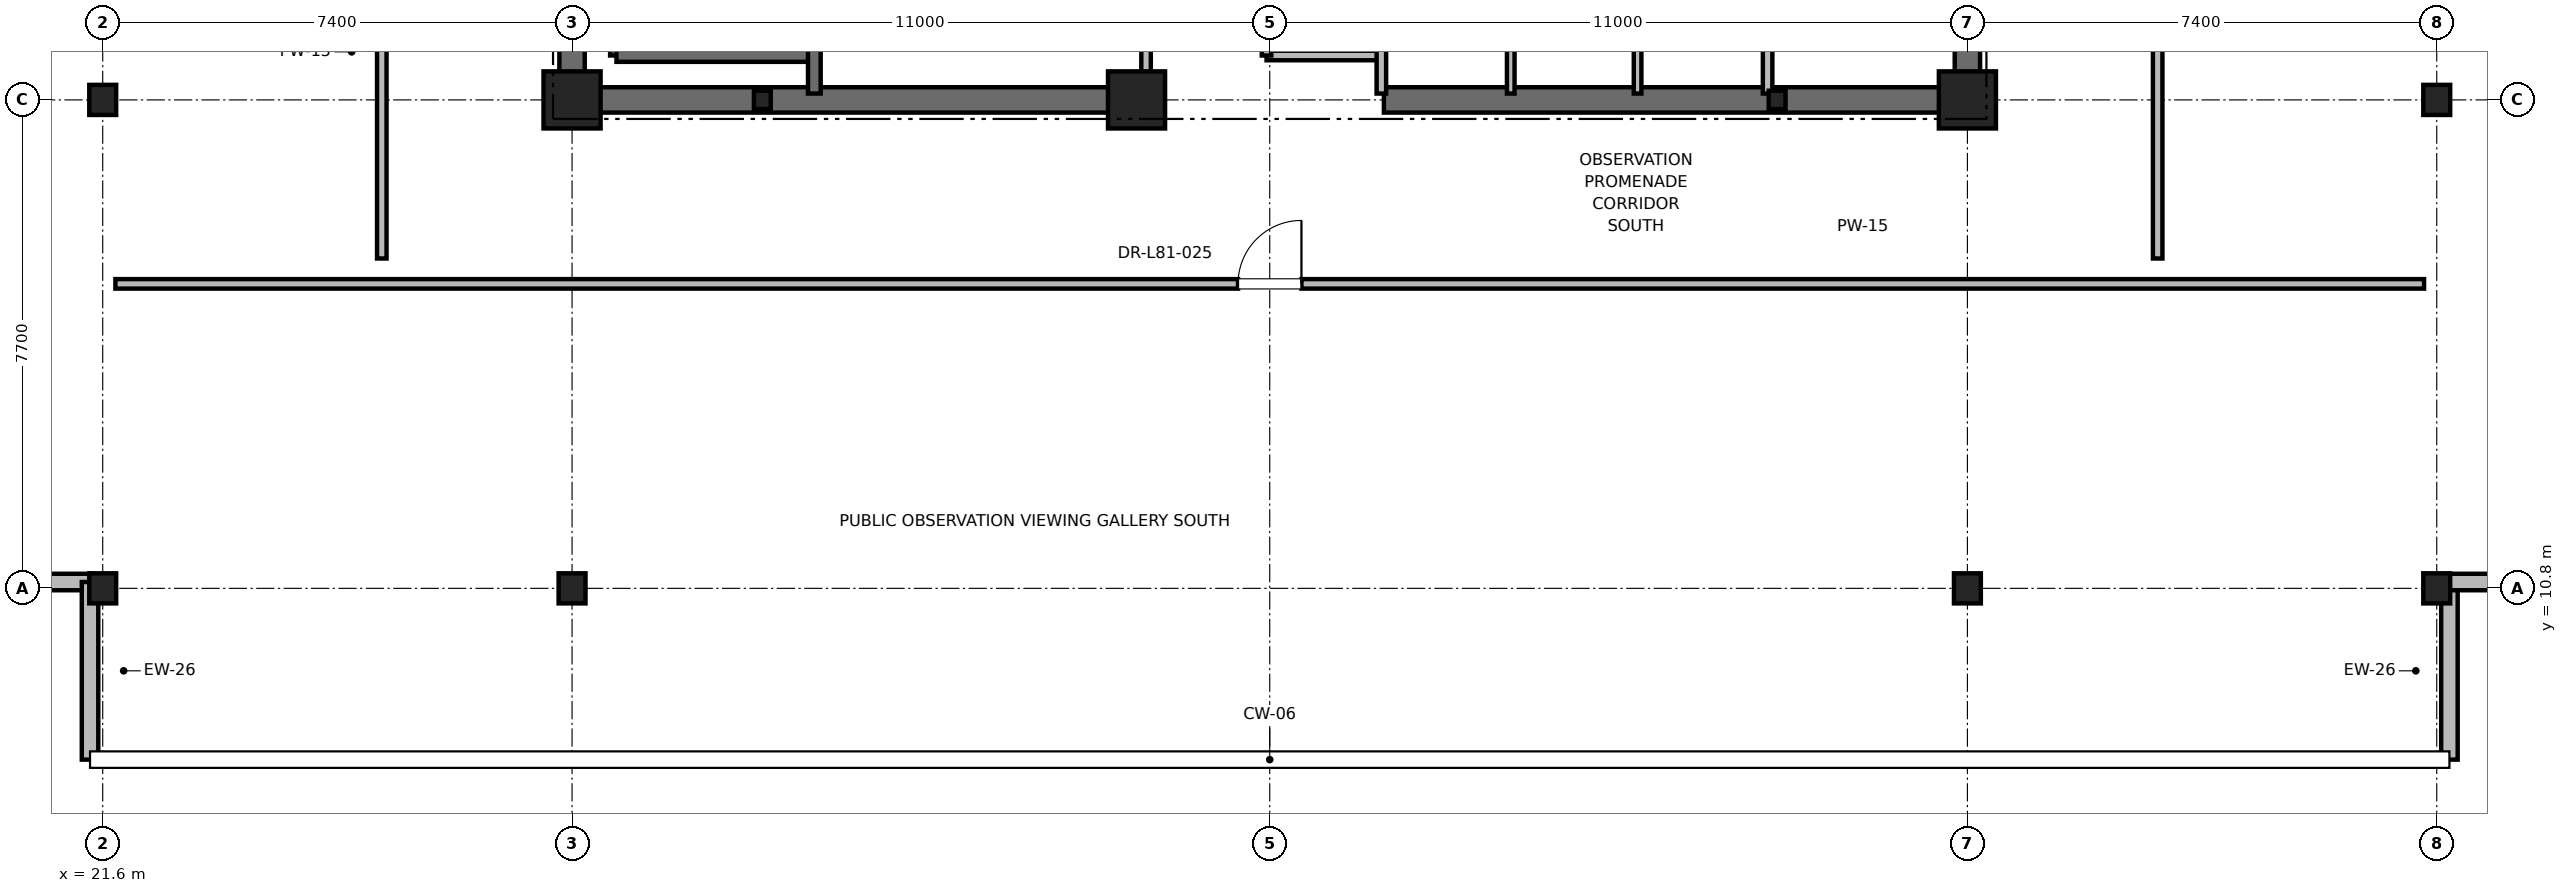
"""IFC4 building model, lengths in metres.
Left out: names, types, materials, properties, quantities, classifications, styles, units other than length and angle.
Written with IfcOpenShell. Run it as: python <this file> out.ifc"""

import sys

from ifc_helpers import new_model, si_unit, direction, frame, frame_2d, origin, origin_2d, place, context, subcontext, project, spatial, rectangle, i_section, extrude, element, fill, save


model = new_model("IFC4")
c1 = context("Model", 3, precision=1e-05, world=origin(), true_north=direction((0.0, 1.0)))
c2 = subcontext(c1, "Body", "Model", "MODEL_VIEW")
j1 = project(units=[si_unit("LENGTHUNIT", "METRE"), si_unit("PLANEANGLEUNIT", "RADIAN")], contexts=[c1])
p1 = place(None, origin())
s1 = spatial("IfcSite", under=j1, at=p1, CompositionType="ELEMENT")
p2 = place(p1, origin())
s2 = spatial("IfcBuilding", under=s1, at=p2, CompositionType="ELEMENT")
p3 = place(p2, frame((0.0, 0.0, 348.8)))
s3 = spatial("IfcBuildingStorey", under=s2, at=p3, CompositionType="ELEMENT", Elevation=348.8)
for number, where, z_axis, x_axis in (
    (1, (29.0, 10.8, 0.0), (0.0, 0.0, 1.0), (1.0, 0.0, 0.0)),
    (2, (51.0, 10.8, 0.0), (0.0, 0.0, 1.0), (1.0, 0.0, 0.0)),
    (3, (21.6, 18.5, 0.0), (0.0, 0.0, 1.0), (1.0, 0.0, 0.0)),
    (4, (58.4, 18.5, 0.0), (0.0, 0.0, 1.0), (1.0, 0.0, 0.0)),
    (5, (21.6, 10.8, 0.0), (0.0, 0.0, 1.0), (1.0, 0.0, 0.0)),
    (6, (58.4, 10.8, 0.0), (0.0, 0.0, 1.0), (1.0, 0.0, 0.0)),
):
    element("IfcColumn", number, at=place(p3, frame(where, z_axis=z_axis, x_axis=x_axis)), inside=s3, PredefinedType="COLUMN", context=c2, shape_type="SweptSolid", body=[
        extrude(i_section(OverallWidth=0.424, OverallDepth=0.475, WebThickness=0.048, FlangeThickness=0.077, FilletRadius=0.015, at=origin_2d()), origin(), (0.0, 0.0, 1.0), 5.5),
    ])
for number, where, z_axis, x_axis in (
    (7, (29.0, 18.5, 0.0), (0.0, 0.0, 1.0), (1.0, 0.0, 0.0)),
    (8, (51.0, 18.5, 0.0), (0.0, 0.0, 1.0), (1.0, 0.0, 0.0)),
    (9, (37.9, 18.5, 0.0), (0.0, 0.0, 1.0), (1.0, 0.0, 0.0)),
):
    element("IfcColumn", number, at=place(p3, frame(where, z_axis=z_axis, x_axis=x_axis)), inside=s3, PredefinedType="PILASTER", context=c2, shape_type="SweptSolid", body=[
        extrude(rectangle(XDim=0.9, YDim=0.9, at=origin_2d()), origin(), (0.0, 0.0, 1.0), 5.5),
    ])
for number, where, z_axis, x_axis in (
    (10, (32.0, 18.5, 0.0), (0.0, 0.0, 1.0), (1.0, 0.0, 0.0)),
    (11, (48.0, 18.5, 0.0), (0.0, 0.0, 1.0), (1.0, 0.0, 0.0)),
):
    element("IfcColumn", number, at=place(p3, frame(where, z_axis=z_axis, x_axis=x_axis)), inside=s3, PredefinedType="COLUMN", context=c2, shape_type="SweptSolid", body=[
        extrude(i_section(OverallWidth=0.265, OverallDepth=0.289, WebThickness=0.019, FlangeThickness=0.032, FilletRadius=0.013, at=origin_2d()), origin(), (0.0, 0.0, 1.0), 5.5),
    ])
for number, where, z_axis, x_axis in (
    (12, (29.0, 18.5, 0.0), (0.0, 0.0, 1.0), (1.0, 0.0, 0.0)),
    (13, (41.8, 18.5, 0.0), (0.0, 0.0, 1.0), (1.0, 0.0, 0.0)),
):
    element("IfcWall", number, at=place(p3, frame(where, z_axis=z_axis, x_axis=x_axis)), inside=s3, PredefinedType="SHEAR", context=c2, shape_type="SweptSolid", body=[
        extrude(rectangle(XDim=9.2, YDim=0.4, at=frame_2d((4.6, 0.0))), origin(), (0.0, 0.0, 1.0), 5.2),
    ])
p4 = place(p3, frame((29.0, 18.5, 0.0), z_axis=(0.0, 0.0, 1.0), x_axis=(0.0, 1.0, 0.0)))
e14 = element("IfcWall", 14, at=p4, inside=s3, PredefinedType="SHEAR", context=c2, shape_type="SweptSolid", body=[
    extrude(rectangle(XDim=8.8, YDim=0.4, at=frame_2d((4.4, 0.0))), origin(), (0.0, 0.0, 1.0), 5.2),
])
p5 = place(p3, frame((51.0, 18.5, 0.0), z_axis=(0.0, 0.0, 1.0), x_axis=(0.0, 1.0, 0.0)))
e15 = element("IfcWall", 15, at=p5, inside=s3, PredefinedType="SHEAR", context=c2, shape_type="SweptSolid", body=[
    extrude(rectangle(XDim=5.8, YDim=0.4, at=frame_2d((2.9, 0.0))), origin(), (0.0, 0.0, 1.0), 5.2),
])
p6 = place(p3, frame((18.2, 10.9, 0.0), z_axis=(0.0, 0.0, 1.0), x_axis=(1.0, 0.0, 0.0)))
e16 = element("IfcWall", 16, at=p6, inside=s3, PredefinedType="PARAPET", context=c2, shape_type="SweptSolid", body=[
    extrude(rectangle(XDim=3.2, YDim=0.26, at=frame_2d((1.6, 0.0))), origin(), (0.0, 0.0, 1.0), 4.635),
])
p7 = place(p6, frame((0.9, 0.0, 0.85)))
e17 = element("IfcOpeningElement", 17, at=p7, cuts=e16, PredefinedType="OPENING", context=c2, shape_type="SweptSolid", body=[
    extrude(rectangle(XDim=1.4, YDim=2.0, at=frame_2d((0.7, 1.0))), frame((0.0, 0.13, 0.0), z_axis=(0.0, -1.0, 0.0), x_axis=(1.0, 0.0, 0.0)), (0.0, 0.0, 1.0), 0.26),
])
for number, where, z_axis, x_axis in (
    (18, (21.4, 10.9, 0.0), (0.0, 0.0, 1.0), (0.0, -1.0, 0.0)),
    (19, (58.6, 8.1, 0.0), (0.0, 0.0, 1.0), (0.0, 1.0, 0.0)),
):
    element("IfcWall", number, at=place(p3, frame(where, z_axis=z_axis, x_axis=x_axis)), inside=s3, PredefinedType="PARAPET", context=c2, shape_type="SweptSolid", body=[
        extrude(rectangle(XDim=2.8, YDim=0.26, at=frame_2d((1.4, 0.0))), origin(), (0.0, 0.0, 1.0), 4.635),
    ])
p8 = place(p3, frame((58.6, 10.9, 0.0), z_axis=(0.0, 0.0, 1.0), x_axis=(1.0, 0.0, 0.0)))
e20 = element("IfcWall", 20, at=p8, inside=s3, PredefinedType="PARAPET", context=c2, shape_type="SweptSolid", body=[
    extrude(rectangle(XDim=3.2, YDim=0.26, at=frame_2d((1.6, 0.0))), origin(), (0.0, 0.0, 1.0), 4.635),
])
p9 = place(p3, frame((29.7, 19.2, 0.0), z_axis=(0.0, 0.0, 1.0), x_axis=(0.0, 1.0, 0.0)))
e21 = element("IfcWall", 21, at=p9, inside=s3, PredefinedType="SOLIDWALL", context=c2, shape_type="SweptSolid", body=[
    extrude(rectangle(XDim=8.15, YDim=0.2, at=frame_2d((4.075, 0.0))), origin(), (0.0, 0.0, 1.0), 5.2),
])
p10 = place(p3, frame((29.7, 19.2, 0.0), z_axis=(0.0, 0.0, 1.0), x_axis=(1.0, 0.0, 0.0)))
e22 = element("IfcWall", 22, at=p10, inside=s3, PredefinedType="SOLIDWALL", context=c2, shape_type="SweptSolid", body=[
    extrude(rectangle(XDim=3.12, YDim=0.2, at=frame_2d((1.56, 0.0))), origin(), (0.0, 0.0, 1.0), 5.2),
])
p11 = place(p3, frame((32.82, 18.6, 0.0), z_axis=(0.0, 0.0, 1.0), x_axis=(0.0, 1.0, 0.0)))
e23 = element("IfcWall", 23, at=p11, inside=s3, PredefinedType="SOLIDWALL", context=c2, shape_type="SweptSolid", body=[
    extrude(rectangle(XDim=8.78, YDim=0.2, at=frame_2d((4.39, 0.0))), origin(), (0.0, 0.0, 1.0), 5.2),
])
p12 = place(p3, frame((39.95, 19.2, 0.0), z_axis=(0.0, 0.0, 1.0), x_axis=(1.0, 0.0, 0.0)))
e24 = element("IfcWall", 24, at=p12, inside=s3, PredefinedType="PARTITIONING", context=c2, shape_type="SweptSolid", body=[
    extrude(rectangle(XDim=1.81, YDim=0.15, at=frame_2d((0.905, 0.0))), origin(), (0.0, 0.0, 1.0), 2.85),
])
p13 = place(p3, frame((41.76, 18.6, 0.0), z_axis=(0.0, 0.0, 1.0), x_axis=(0.0, 1.0, 0.0)))
e25 = element("IfcWall", 25, at=p13, inside=s3, PredefinedType="PARTITIONING", context=c2, shape_type="SweptSolid", body=[
    extrude(rectangle(XDim=3.6, YDim=0.15, at=frame_2d((1.8, 0.0))), origin(), (0.0, 0.0, 1.0), 2.85),
])
p14 = place(p3, frame((39.95, 19.2, 0.0), z_axis=(0.0, 0.0, 1.0), x_axis=(0.0, 1.0, 0.0)))
e26 = element("IfcWall", 26, at=p14, inside=s3, PredefinedType="PARTITIONING", context=c2, shape_type="SweptSolid", body=[
    extrude(rectangle(XDim=3.0, YDim=0.15, at=frame_2d((1.5, 0.0))), origin(), (0.0, 0.0, 1.0), 2.85),
])
p15 = place(p14, frame((1.05, 0.0, 0.0)))
e27 = element("IfcOpeningElement", 27, at=p15, cuts=e26, PredefinedType="OPENING", context=c2, shape_type="SweptSolid", body=[
    extrude(rectangle(XDim=0.9, YDim=2.1, at=frame_2d((0.45, 1.05))), frame((0.0, 0.075, 0.0), z_axis=(0.0, -1.0, 0.0), x_axis=(1.0, 0.0, 0.0)), (0.0, 0.0, 1.0), 0.15),
])
p16 = place(p3, frame((38.05, 18.6, 0.0), z_axis=(0.0, 0.0, 1.0), x_axis=(0.0, 1.0, 0.0)))
e28 = element("IfcWall", 28, at=p16, inside=s3, PredefinedType="PARTITIONING", context=c2, shape_type="SweptSolid", body=[
    extrude(rectangle(XDim=3.06, YDim=0.15, at=frame_2d((1.53, 0.0))), origin(), (0.0, 0.0, 1.0), 2.85),
])
p17 = place(p16, frame((1.03, 0.0, 0.0)))
e29 = element("IfcOpeningElement", 29, at=p17, cuts=e28, PredefinedType="OPENING", context=c2, shape_type="SweptSolid", body=[
    extrude(rectangle(XDim=1.0, YDim=2.15, at=frame_2d((0.5, 1.075))), frame((0.0, 0.075, 0.0), z_axis=(0.0, -1.0, 0.0), x_axis=(1.0, 0.0, 0.0)), (0.0, 0.0, 1.0), 0.15),
])
p18 = place(p3, frame((47.85, 18.6, 0.0), z_axis=(0.0, 0.0, 1.0), x_axis=(0.0, 1.0, 0.0)))
e30 = element("IfcWall", 30, at=p18, inside=s3, PredefinedType="PARTITIONING", context=c2, shape_type="SweptSolid", body=[
    extrude(rectangle(XDim=2.54, YDim=0.15, at=frame_2d((1.27, 0.0))), origin(), (0.0, 0.0, 1.0), 2.85),
])
for number, where, z_axis, x_axis in (
    (31, (43.8, 18.6, 0.0), (0.0, 0.0, 1.0), (0.0, 1.0, 0.0)),
    (32, (45.8, 18.6, 0.0), (0.0, 0.0, 1.0), (0.0, 1.0, 0.0)),
):
    element("IfcWall", number, at=place(p3, frame(where, z_axis=z_axis, x_axis=x_axis)), inside=s3, PredefinedType="PARTITIONING", context=c2, shape_type="SweptSolid", body=[
        extrude(rectangle(XDim=3.02, YDim=0.12, at=frame_2d((1.51, 0.0))), origin(), (0.0, 0.0, 1.0), 2.85),
    ])
p19 = place(p3, frame((21.8, 15.6, 0.0), z_axis=(0.0, 0.0, 1.0), x_axis=(1.0, 0.0, 0.0)))
e33 = element("IfcWall", 33, at=p19, inside=s3, PredefinedType="PARTITIONING", context=c2, shape_type="SweptSolid", body=[
    extrude(rectangle(XDim=36.4, YDim=0.15, at=frame_2d((18.2, 0.0))), origin(), (0.0, 0.0, 1.0), 2.85),
])
p20 = place(p19, frame((17.7, 0.0, 0.0)))
e34 = element("IfcOpeningElement", 34, at=p20, cuts=e33, PredefinedType="OPENING", context=c2, shape_type="SweptSolid", body=[
    extrude(rectangle(XDim=1.0, YDim=2.15, at=frame_2d((0.5, 1.075))), frame((0.0, 0.075, 0.0), z_axis=(0.0, -1.0, 0.0), x_axis=(1.0, 0.0, 0.0)), (0.0, 0.0, 1.0), 0.15),
])
p21 = place(p3, frame((26.0, 16.0, 0.0), z_axis=(0.0, 0.0, 1.0), x_axis=(0.0, 1.0, 0.0)))
e35 = element("IfcWall", 35, at=p21, inside=s3, PredefinedType="PARTITIONING", context=c2, shape_type="SweptSolid", body=[
    extrude(rectangle(XDim=11.5, YDim=0.15, at=frame_2d((5.75, 0.0))), origin(), (0.0, 0.0, 1.0), 2.85),
])
p22 = place(p21, frame((6.515, 0.0, 0.0)))
e36 = element("IfcOpeningElement", 36, at=p22, cuts=e35, PredefinedType="OPENING", context=c2, shape_type="SweptSolid", body=[
    extrude(rectangle(XDim=1.0, YDim=2.15, at=frame_2d((0.5, 1.075))), frame((0.0, 0.075, 0.0), z_axis=(0.0, -1.0, 0.0), x_axis=(1.0, 0.0, 0.0)), (0.0, 0.0, 1.0), 0.15),
])
p23 = place(p3, frame((54.0, 16.0, 0.0), z_axis=(0.0, 0.0, 1.0), x_axis=(0.0, 1.0, 0.0)))
e37 = element("IfcWall", 37, at=p23, inside=s3, PredefinedType="PARTITIONING", context=c2, shape_type="SweptSolid", body=[
    extrude(rectangle(XDim=23.0, YDim=0.15, at=frame_2d((11.5, 0.0))), origin(), (0.0, 0.0, 1.0), 2.85),
])
p24 = place(p23, frame((11.0, 0.0, 0.0)))
e38 = element("IfcOpeningElement", 38, at=p24, cuts=e37, PredefinedType="OPENING", context=c2, shape_type="SweptSolid", body=[
    extrude(rectangle(XDim=1.0, YDim=2.15, at=frame_2d((0.5, 1.075))), frame((0.0, 0.075, 0.0), z_axis=(0.0, -1.0, 0.0), x_axis=(1.0, 0.0, 0.0)), (0.0, 0.0, 1.0), 0.15),
])
p25 = place(p20, origin())
e39 = element("IfcDoor", 39, at=p25, inside=s3, OperationType="SINGLE_SWING_RIGHT", PredefinedType="DOOR", context=c2, shape_type="SweptSolid", body=[
    extrude(rectangle(XDim=1.0, YDim=2.15, at=frame_2d((0.5, 1.075))), frame((0.0, 0.025, 0.0), z_axis=(0.0, -1.0, 0.0), x_axis=(1.0, 0.0, 0.0)), (0.0, 0.0, 1.0), 0.05),
])
fill(e34, e39)
save(model, sys.argv[1])
